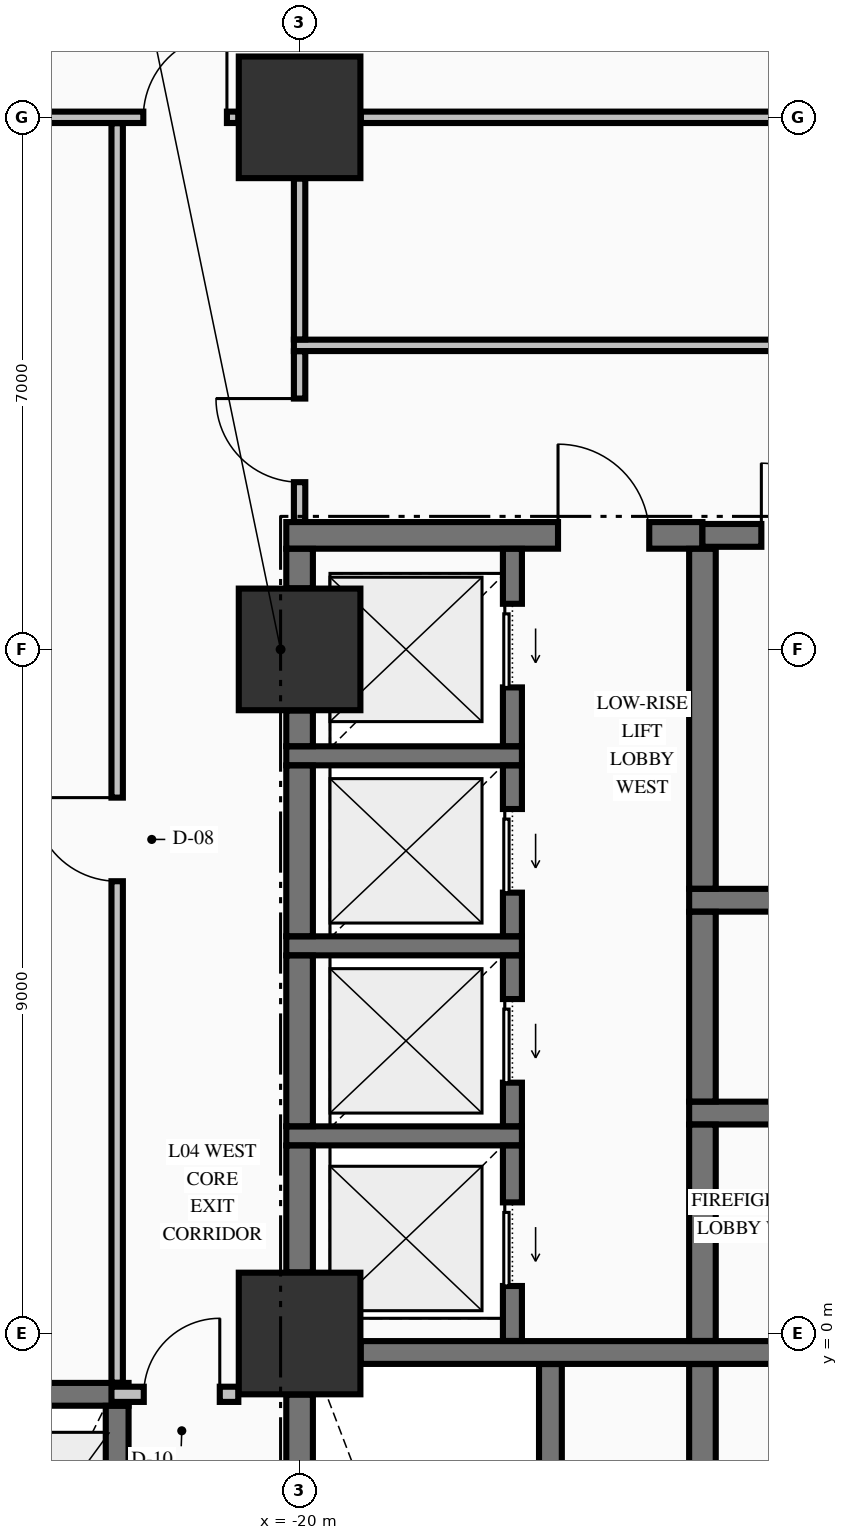
"""IFC4 building model, lengths in metres.
Left out: names, types, materials, properties, quantities, classifications, styles, units other than length and angle.
Written with IfcOpenShell. Run it as: python <this file> out.ifc"""

import sys

from ifc_helpers import new_model, si_unit, direction, frame, frame_2d, origin, origin_2d, place, context, subcontext, project, spatial, rectangle, extrude, element, fill, save


model = new_model("IFC4")
c1 = context("Model", 3, precision=1e-05, world=origin(), true_north=direction((0.0, 1.0)))
c2 = subcontext(c1, "Body", "Model", "MODEL_VIEW")
j1 = project(units=[si_unit("LENGTHUNIT", "METRE"), si_unit("PLANEANGLEUNIT", "RADIAN")], contexts=[c1])
p1 = place(None, origin())
s1 = spatial("IfcSite", under=j1, at=p1, CompositionType="ELEMENT")
p2 = place(p1, origin())
s2 = spatial("IfcBuilding", under=s1, at=p2, CompositionType="ELEMENT")
p3 = place(p2, frame((0.0, 0.0, 21.76)))
s3 = spatial("IfcBuildingStorey", under=s2, at=p3, CompositionType="ELEMENT", Elevation=21.76)
for number, where, z_axis, x_axis in (
    (1, (-20.0, 0.0, -0.45), (0.0, 0.0, 1.0), (1.0, 0.0, 0.0)),
    (2, (-20.0, 9.0, -0.45), (0.0, 0.0, 1.0), (1.0, 0.0, 0.0)),
    (3, (-20.0, 16.0, -0.45), (0.0, 0.0, 1.0), (1.0, 0.0, 0.0)),
):
    element("IfcColumn", number, at=place(p3, frame(where, z_axis=z_axis, x_axis=x_axis)), inside=s3, PredefinedType="COLUMN", context=c2, shape_type="SweptSolid", body=[
        extrude(rectangle(XDim=1.6, YDim=1.6, at=origin_2d()), origin(), (0.0, 0.0, 1.0), 5.44),
    ])
p4 = place(p3, frame((-25.296, -0.8, 0.0), z_axis=(0.0, 0.0, 1.0), x_axis=(1.0, 0.0, 0.0)))
e4 = element("IfcWall", 4, at=p4, inside=s3, PredefinedType="SHEAR", context=c2, shape_type="SweptSolid", body=[
    extrude(rectangle(XDim=3.046, YDim=0.3, at=frame_2d((1.523, 0.0))), origin(), (0.0, 0.0, 1.0), 4.99),
])
p5 = place(p3, frame((-19.196, -0.25, 0.0), z_axis=(0.0, 0.0, 1.0), x_axis=(1.0, 0.0, 0.0)))
e5 = element("IfcWall", 5, at=p5, inside=s3, PredefinedType="SHEAR", context=c2, shape_type="SweptSolid", body=[
    extrude(rectangle(XDim=7.392, YDim=0.3, at=frame_2d((3.696, 0.0))), origin(), (0.0, 0.0, 1.0), 4.99),
])
p6 = place(p5, frame((5.496, 0.0, 0.0)))
e6 = element("IfcOpeningElement", 6, at=p6, cuts=e5, PredefinedType="OPENING", context=c2, shape_type="SweptSolid", body=[
    extrude(rectangle(XDim=1.1, YDim=2.15, at=frame_2d((0.55, 1.075))), frame((0.0, 0.16, 0.0), z_axis=(0.0, -1.0, 0.0), x_axis=(1.0, 0.0, 0.0)), (0.0, 0.0, 1.0), 0.32),
])
p7 = place(p3, frame((-20.175, 2.6, 0.0), z_axis=(0.0, 0.0, 1.0), x_axis=(1.0, 0.0, 0.0)))
e7 = element("IfcWall", 7, at=p7, inside=s3, PredefinedType="SOLIDWALL", context=c2, shape_type="SweptSolid", body=[
    extrude(rectangle(XDim=3.1, YDim=0.25, at=frame_2d((1.55, 0.0))), origin(), (0.0, 0.0, 1.0), 4.99),
])
p8 = place(p3, frame((-14.875, 2.9, 0.0), z_axis=(0.0, 0.0, 1.0), x_axis=(1.0, 0.0, 0.0)))
e8 = element("IfcWall", 8, at=p8, inside=s3, PredefinedType="SHEAR", context=c2, shape_type="SweptSolid", body=[
    extrude(rectangle(XDim=4.025, YDim=0.3, at=frame_2d((2.012, 0.0))), origin(), (0.0, 0.0, 1.0), 4.99),
])
p9 = place(p8, frame((2.075, 0.0, 0.0)))
e9 = element("IfcOpeningElement", 9, at=p9, cuts=e8, PredefinedType="OPENING", context=c2, shape_type="SweptSolid", body=[
    extrude(rectangle(XDim=1.1, YDim=2.2, at=frame_2d((0.55, 1.1))), frame((0.0, 0.16, 0.0), z_axis=(0.0, -1.0, 0.0), x_axis=(1.0, 0.0, 0.0)), (0.0, 0.0, 1.0), 0.32),
])
p10 = place(p3, frame((-20.175, 5.1, 0.0), z_axis=(0.0, 0.0, 1.0), x_axis=(1.0, 0.0, 0.0)))
e10 = element("IfcWall", 10, at=p10, inside=s3, PredefinedType="SOLIDWALL", context=c2, shape_type="SweptSolid", body=[
    extrude(rectangle(XDim=3.1, YDim=0.25, at=frame_2d((1.55, 0.0))), origin(), (0.0, 0.0, 1.0), 4.99),
])
p11 = place(p3, frame((-14.875, 5.7, 0.0), z_axis=(0.0, 0.0, 1.0), x_axis=(1.0, 0.0, 0.0)))
e11 = element("IfcWall", 11, at=p11, inside=s3, PredefinedType="SHEAR", context=c2, shape_type="SweptSolid", body=[
    extrude(rectangle(XDim=4.025, YDim=0.3, at=frame_2d((2.012, 0.0))), origin(), (0.0, 0.0, 1.0), 4.99),
])
p12 = place(p3, frame((-20.175, 7.6, 0.0), z_axis=(0.0, 0.0, 1.0), x_axis=(1.0, 0.0, 0.0)))
e12 = element("IfcWall", 12, at=p12, inside=s3, PredefinedType="SOLIDWALL", context=c2, shape_type="SweptSolid", body=[
    extrude(rectangle(XDim=3.1, YDim=0.25, at=frame_2d((1.55, 0.0))), origin(), (0.0, 0.0, 1.0), 4.99),
])
p13 = place(p3, frame((-20.175, 10.5, 0.0), z_axis=(0.0, 0.0, 1.0), x_axis=(1.0, 0.0, 0.0)))
e13 = element("IfcWall", 13, at=p13, inside=s3, PredefinedType="SHEAR", context=c2, shape_type="SweptSolid", body=[
    extrude(rectangle(XDim=5.475, YDim=0.35, at=frame_2d((2.738, 0.0))), origin(), (0.0, 0.0, 1.0), 4.99),
])
p14 = place(p13, frame((3.575, 0.0, 0.0)))
e14 = element("IfcOpeningElement", 14, at=p14, cuts=e13, PredefinedType="OPENING", context=c2, shape_type="SweptSolid", body=[
    extrude(rectangle(XDim=1.2, YDim=2.15, at=frame_2d((0.6, 1.075))), frame((0.0, 0.185, 0.0), z_axis=(0.0, -1.0, 0.0), x_axis=(1.0, 0.0, 0.0)), (0.0, 0.0, 1.0), 0.37),
])
p15 = place(p3, frame((-14.7, 10.5, 0.0), z_axis=(0.0, 0.0, 1.0), x_axis=(1.0, 0.0, 0.0)))
e15 = element("IfcWall", 15, at=p15, inside=s3, PredefinedType="SHEAR", context=c2, shape_type="SweptSolid", body=[
    extrude(rectangle(XDim=3.85, YDim=0.3, at=frame_2d((1.925, 0.0))), origin(), (0.0, 0.0, 1.0), 4.99),
])
p16 = place(p15, frame((0.775, 0.0, 0.0)))
e16 = element("IfcOpeningElement", 16, at=p16, cuts=e15, PredefinedType="OPENING", context=c2, shape_type="SweptSolid", body=[
    extrude(rectangle(XDim=0.95, YDim=2.15, at=frame_2d((0.475, 1.075))), frame((0.0, 0.16, 0.0), z_axis=(0.0, -1.0, 0.0), x_axis=(1.0, 0.0, 0.0)), (0.0, 0.0, 1.0), 0.32),
])
p17 = place(p3, frame((-22.475, -0.8, 0.0), z_axis=(0.0, 0.0, 1.0), x_axis=(1.0, 0.0, 0.0)))
e17 = element("IfcWall", 17, at=p17, inside=s3, PredefinedType="PARTITIONING", context=c2, shape_type="SweptSolid", body=[
    extrude(rectangle(XDim=1.669, YDim=0.2, at=frame_2d((0.834, 0.0))), origin(), (0.0, 0.0, 1.0), 4.99),
])
p18 = place(p17, frame((0.425, 0.0, 0.0)))
e18 = element("IfcOpeningElement", 18, at=p18, cuts=e17, PredefinedType="OPENING", context=c2, shape_type="SweptSolid", body=[
    extrude(rectangle(XDim=1.0, YDim=2.15, at=frame_2d((0.5, 1.075))), frame((0.0, 0.11, 0.0), z_axis=(0.0, -1.0, 0.0), x_axis=(1.0, 0.0, 0.0)), (0.0, 0.0, 1.0), 0.22),
])
p19 = place(p3, frame((-20.075, 13.0, 0.0), z_axis=(0.0, 0.0, 1.0), x_axis=(1.0, 0.0, 0.0)))
e19 = element("IfcWall", 19, at=p19, inside=s3, PredefinedType="PARTITIONING", context=c2, shape_type="SweptSolid", body=[
    extrude(rectangle(XDim=40.15, YDim=0.15, at=frame_2d((20.075, 0.0))), origin(), (0.0, 0.0, 1.0), 4.99),
])
p20 = place(p19, frame((9.725, 0.0, 0.0)))
e20 = element("IfcOpeningElement", 20, at=p20, cuts=e19, PredefinedType="OPENING", context=c2, shape_type="SweptSolid", body=[
    extrude(rectangle(XDim=1.1, YDim=2.15, at=frame_2d((0.55, 1.075))), frame((0.0, 0.085, 0.0), z_axis=(0.0, -1.0, 0.0), x_axis=(1.0, 0.0, 0.0)), (0.0, 0.0, 1.0), 0.17),
])
p21 = place(p19, frame((29.325, 0.0, 0.0)))
e21 = element("IfcOpeningElement", 21, at=p21, cuts=e19, PredefinedType="OPENING", context=c2, shape_type="SweptSolid", body=[
    extrude(rectangle(XDim=1.1, YDim=2.15, at=frame_2d((0.55, 1.075))), frame((0.0, 0.085, 0.0), z_axis=(0.0, -1.0, 0.0), x_axis=(1.0, 0.0, 0.0)), (0.0, 0.0, 1.0), 0.17),
])
p22 = place(p3, frame((-25.294, 16.0, 0.0), z_axis=(0.0, 0.0, 1.0), x_axis=(1.0, 0.0, 0.0)))
e22 = element("IfcWall", 22, at=p22, inside=s3, PredefinedType="PARTITIONING", context=c2, shape_type="SweptSolid", body=[
    extrude(rectangle(XDim=4.488, YDim=0.15, at=frame_2d((2.244, 0.0))), origin(), (0.0, 0.0, 1.0), 3.332),
])
p23 = place(p22, frame((3.238, 0.0, 0.0)))
e23 = element("IfcOpeningElement", 23, at=p23, cuts=e22, PredefinedType="OPENING", context=c2, shape_type="SweptSolid", body=[
    extrude(rectangle(XDim=1.1, YDim=2.15, at=frame_2d((0.55, 1.075))), frame((0.0, 0.085, 0.0), z_axis=(0.0, -1.0, 0.0), x_axis=(1.0, 0.0, 0.0)), (0.0, 0.0, 1.0), 0.17),
])
p24 = place(p3, frame((-19.194, 16.0, 0.0), z_axis=(0.0, 0.0, 1.0), x_axis=(1.0, 0.0, 0.0)))
e24 = element("IfcWall", 24, at=p24, inside=s3, PredefinedType="PARTITIONING", context=c2, shape_type="SweptSolid", body=[
    extrude(rectangle(XDim=7.388, YDim=0.15, at=frame_2d((3.694, 0.0))), origin(), (0.0, 0.0, 1.0), 3.332),
])
p25 = place(p3, frame((-22.4, -4.648, 0.0), z_axis=(0.0, 0.0, 1.0), x_axis=(0.0, 1.0, 0.0)))
e25 = element("IfcWall", 25, at=p25, inside=s3, PredefinedType="SHEAR", context=c2, shape_type="SweptSolid", body=[
    extrude(rectangle(XDim=3.696, YDim=0.3, at=frame_2d((1.848, 0.0))), origin(), (0.0, 0.0, 1.0), 4.99),
])
p26 = place(p25, frame((1.198, 0.0, 0.0)))
e26 = element("IfcOpeningElement", 26, at=p26, cuts=e25, PredefinedType="OPENING", context=c2, shape_type="SweptSolid", body=[
    extrude(rectangle(XDim=1.3, YDim=2.3, at=frame_2d((0.65, 1.15))), frame((0.0, 0.16, 0.0), z_axis=(0.0, -1.0, 0.0), x_axis=(1.0, 0.0, 0.0)), (0.0, 0.0, 1.0), 0.32),
])
p27 = place(p3, frame((-20.0, -8.196, 0.0), z_axis=(0.0, 0.0, 1.0), x_axis=(0.0, 1.0, 0.0)))
e27 = element("IfcWall", 27, at=p27, inside=s3, PredefinedType="SHEAR", context=c2, shape_type="SweptSolid", body=[
    extrude(rectangle(XDim=7.392, YDim=0.35, at=frame_2d((3.696, 0.0))), origin(), (0.0, 0.0, 1.0), 4.99),
])
p28 = place(p3, frame((-20.0, 0.804, 0.0), z_axis=(0.0, 0.0, 1.0), x_axis=(0.0, 1.0, 0.0)))
e28 = element("IfcWall", 28, at=p28, inside=s3, PredefinedType="SHEAR", context=c2, shape_type="SweptSolid", body=[
    extrude(rectangle(XDim=1.669, YDim=0.35, at=frame_2d((0.834, 0.0))), origin(), (0.0, 0.0, 1.0), 4.99),
])
for number, where, z_axis, x_axis in (
    (29, (-20.0, 2.727, 0.0), (0.0, 0.0, 1.0), (0.0, 1.0, 0.0)),
    (30, (-20.0, 5.227, 0.0), (0.0, 0.0, 1.0), (0.0, 1.0, 0.0)),
):
    element("IfcWall", number, at=place(p3, frame(where, z_axis=z_axis, x_axis=x_axis)), inside=s3, PredefinedType="SHEAR", context=c2, shape_type="SweptSolid", body=[
        extrude(rectangle(XDim=2.246, YDim=0.35, at=frame_2d((1.123, 0.0))), origin(), (0.0, 0.0, 1.0), 4.99),
    ])
p29 = place(p3, frame((-20.0, 7.727, 0.0), z_axis=(0.0, 0.0, 1.0), x_axis=(0.0, 1.0, 0.0)))
e31 = element("IfcWall", 31, at=p29, inside=s3, PredefinedType="SHEAR", context=c2, shape_type="SweptSolid", body=[
    extrude(rectangle(XDim=0.469, YDim=0.35, at=frame_2d((0.234, 0.0))), origin(), (0.0, 0.0, 1.0), 4.99),
])
p30 = place(p3, frame((-20.0, 9.804, 0.0), z_axis=(0.0, 0.0, 1.0), x_axis=(0.0, 1.0, 0.0)))
e32 = element("IfcWall", 32, at=p30, inside=s3, PredefinedType="SHEAR", context=c2, shape_type="SweptSolid", body=[
    extrude(rectangle(XDim=0.519, YDim=0.35, at=frame_2d((0.26, 0.0))), origin(), (0.0, 0.0, 1.0), 4.99),
])
p31 = place(p3, frame((-17.2, -0.098, 0.0), z_axis=(0.0, 0.0, 1.0), x_axis=(0.0, 1.0, 0.0)))
e33 = element("IfcWall", 33, at=p31, inside=s3, PredefinedType="SOLIDWALL", context=c2, shape_type="SweptSolid", body=[
    extrude(rectangle(XDim=2.571, YDim=0.25, at=frame_2d((1.285, 0.0))), origin(), (0.0, 0.0, 1.0), 4.99),
])
p32 = place(p31, frame((0.723, 0.0, 0.0)))
e34 = element("IfcOpeningElement", 34, at=p32, cuts=e33, PredefinedType="OPENING", context=c2, shape_type="SweptSolid", body=[
    extrude(rectangle(XDim=1.1, YDim=2.2, at=frame_2d((0.55, 1.1))), frame((0.0, 0.135, 0.0), z_axis=(0.0, -1.0, 0.0), x_axis=(1.0, 0.0, 0.0)), (0.0, 0.0, 1.0), 0.27),
])
p33 = place(p3, frame((-17.2, 2.727, 0.0), z_axis=(0.0, 0.0, 1.0), x_axis=(0.0, 1.0, 0.0)))
e35 = element("IfcWall", 35, at=p33, inside=s3, PredefinedType="SOLIDWALL", context=c2, shape_type="SweptSolid", body=[
    extrude(rectangle(XDim=2.246, YDim=0.25, at=frame_2d((1.123, 0.0))), origin(), (0.0, 0.0, 1.0), 4.99),
])
p34 = place(p33, frame((0.573, 0.0, 0.0)))
e36 = element("IfcOpeningElement", 36, at=p34, cuts=e35, PredefinedType="OPENING", context=c2, shape_type="SweptSolid", body=[
    extrude(rectangle(XDim=1.1, YDim=2.2, at=frame_2d((0.55, 1.1))), frame((0.0, 0.135, 0.0), z_axis=(0.0, -1.0, 0.0), x_axis=(1.0, 0.0, 0.0)), (0.0, 0.0, 1.0), 0.27),
])
p35 = place(p3, frame((-17.2, 5.227, 0.0), z_axis=(0.0, 0.0, 1.0), x_axis=(0.0, 1.0, 0.0)))
e37 = element("IfcWall", 37, at=p35, inside=s3, PredefinedType="SOLIDWALL", context=c2, shape_type="SweptSolid", body=[
    extrude(rectangle(XDim=2.246, YDim=0.25, at=frame_2d((1.123, 0.0))), origin(), (0.0, 0.0, 1.0), 4.99),
])
p36 = place(p35, frame((0.573, 0.0, 0.0)))
e38 = element("IfcOpeningElement", 38, at=p36, cuts=e37, PredefinedType="OPENING", context=c2, shape_type="SweptSolid", body=[
    extrude(rectangle(XDim=1.1, YDim=2.2, at=frame_2d((0.55, 1.1))), frame((0.0, 0.135, 0.0), z_axis=(0.0, -1.0, 0.0), x_axis=(1.0, 0.0, 0.0)), (0.0, 0.0, 1.0), 0.27),
])
p37 = place(p3, frame((-17.2, 7.727, 0.0), z_axis=(0.0, 0.0, 1.0), x_axis=(0.0, 1.0, 0.0)))
e39 = element("IfcWall", 39, at=p37, inside=s3, PredefinedType="SOLIDWALL", context=c2, shape_type="SweptSolid", body=[
    extrude(rectangle(XDim=2.596, YDim=0.25, at=frame_2d((1.298, 0.0))), origin(), (0.0, 0.0, 1.0), 4.99),
])
p38 = place(p37, frame((0.773, 0.0, 0.0)))
e40 = element("IfcOpeningElement", 40, at=p38, cuts=e39, PredefinedType="OPENING", context=c2, shape_type="SweptSolid", body=[
    extrude(rectangle(XDim=1.1, YDim=2.2, at=frame_2d((0.55, 1.1))), frame((0.0, 0.135, 0.0), z_axis=(0.0, -1.0, 0.0), x_axis=(1.0, 0.0, 0.0)), (0.0, 0.0, 1.0), 0.27),
])
p39 = place(p3, frame((-16.7, -9.773, 0.0), z_axis=(0.0, 0.0, 1.0), x_axis=(0.0, 1.0, 0.0)))
e41 = element("IfcWall", 41, at=p39, inside=s3, PredefinedType="SHEAR", context=c2, shape_type="SweptSolid", body=[
    extrude(rectangle(XDim=9.371, YDim=0.3, at=frame_2d((4.686, 0.0))), origin(), (0.0, 0.0, 1.0), 4.99),
])
p40 = place(p3, frame((-14.7, -9.773, 0.0), z_axis=(0.0, 0.0, 1.0), x_axis=(0.0, 1.0, 0.0)))
e42 = element("IfcWall", 42, at=p40, inside=s3, PredefinedType="SHEAR", context=c2, shape_type="SweptSolid", body=[
    extrude(rectangle(XDim=9.371, YDim=0.35, at=frame_2d((4.686, 0.0))), origin(), (0.0, 0.0, 1.0), 4.99),
])
p41 = place(p3, frame((-14.7, -0.098, 0.0), z_axis=(0.0, 0.0, 1.0), x_axis=(0.0, 1.0, 0.0)))
e43 = element("IfcWall", 43, at=p41, inside=s3, PredefinedType="SHEAR", context=c2, shape_type="SweptSolid", body=[
    extrude(rectangle(XDim=2.846, YDim=0.35, at=frame_2d((1.423, 0.0))), origin(), (0.0, 0.0, 1.0), 4.99),
])
p42 = place(p3, frame((-14.7, 3.052, 0.0), z_axis=(0.0, 0.0, 1.0), x_axis=(0.0, 1.0, 0.0)))
e44 = element("IfcWall", 44, at=p42, inside=s3, PredefinedType="SHEAR", context=c2, shape_type="SweptSolid", body=[
    extrude(rectangle(XDim=2.496, YDim=0.35, at=frame_2d((1.248, 0.0))), origin(), (0.0, 0.0, 1.0), 4.99),
])
p43 = place(p3, frame((-14.7, 5.852, 0.0), z_axis=(0.0, 0.0, 1.0), x_axis=(0.0, 1.0, 0.0)))
e45 = element("IfcWall", 45, at=p43, inside=s3, PredefinedType="SHEAR", context=c2, shape_type="SweptSolid", body=[
    extrude(rectangle(XDim=4.471, YDim=0.35, at=frame_2d((2.235, 0.0))), origin(), (0.0, 0.0, 1.0), 4.99),
])
p44 = place(p3, frame((-22.4, -0.647, 0.0), z_axis=(0.0, 0.0, 1.0), x_axis=(0.0, 1.0, 0.0)))
e46 = element("IfcWall", 46, at=p44, inside=s3, PredefinedType="PARTITIONING", context=c2, shape_type="SweptSolid", body=[
    extrude(rectangle(XDim=16.569, YDim=0.15, at=frame_2d((8.285, 0.0))), origin(), (0.0, 0.0, 1.0), 4.99),
])
p45 = place(p44, frame((6.597, 0.0, 0.0)))
e47 = element("IfcOpeningElement", 47, at=p45, cuts=e46, PredefinedType="OPENING", context=c2, shape_type="SweptSolid", body=[
    extrude(rectangle(XDim=1.1, YDim=2.15, at=frame_2d((0.55, 1.075))), frame((0.0, 0.085, 0.0), z_axis=(0.0, -1.0, 0.0), x_axis=(1.0, 0.0, 0.0)), (0.0, 0.0, 1.0), 0.17),
])
p46 = place(p3, frame((-20.0, 10.678, 0.0), z_axis=(0.0, 0.0, 1.0), x_axis=(0.0, 1.0, 0.0)))
e48 = element("IfcWall", 48, at=p46, inside=s3, PredefinedType="PARTITIONING", context=c2, shape_type="SweptSolid", body=[
    extrude(rectangle(XDim=2.244, YDim=0.15, at=frame_2d((1.122, 0.0))), origin(), (0.0, 0.0, 1.0), 4.032),
])
p47 = place(p46, frame((0.522, 0.0, 0.0)))
e49 = element("IfcOpeningElement", 49, at=p47, cuts=e48, PredefinedType="OPENING", context=c2, shape_type="SweptSolid", body=[
    extrude(rectangle(XDim=1.1, YDim=2.15, at=frame_2d((0.55, 1.075))), frame((0.0, 0.085, 0.0), z_axis=(0.0, -1.0, 0.0), x_axis=(1.0, 0.0, 0.0)), (0.0, 0.0, 1.0), 0.17),
])
p48 = place(p3, frame((-20.0, 13.078, 0.0), z_axis=(0.0, 0.0, 1.0), x_axis=(0.0, 1.0, 0.0)))
e50 = element("IfcWall", 50, at=p48, inside=s3, PredefinedType="PARTITIONING", context=c2, shape_type="SweptSolid", body=[
    extrude(rectangle(XDim=2.116, YDim=0.15, at=frame_2d((1.058, 0.0))), origin(), (0.0, 0.0, 1.0), 4.032),
])
p49 = place(p16, origin())
e51 = element("IfcDoor", 51, at=p49, inside=s3, OperationType="SINGLE_SWING_LEFT", PredefinedType="DOOR", context=c2, shape_type="SweptSolid", body=[
    extrude(rectangle(XDim=0.95, YDim=2.15, at=frame_2d((0.475, 1.075))), frame((0.0, 0.025, 0.0), z_axis=(0.0, -1.0, 0.0), x_axis=(1.0, 0.0, 0.0)), (0.0, 0.0, 1.0), 0.05),
])
fill(e16, e51)
p50 = place(p14, origin())
e52 = element("IfcDoor", 52, at=p50, inside=s3, OperationType="SINGLE_SWING_LEFT", PredefinedType="DOOR", context=c2, shape_type="SweptSolid", body=[
    extrude(rectangle(XDim=1.2, YDim=2.15, at=frame_2d((0.6, 1.075))), frame((0.0, 0.025, 0.0), z_axis=(0.0, -1.0, 0.0), x_axis=(1.0, 0.0, 0.0)), (0.0, 0.0, 1.0), 0.05),
])
fill(e14, e52)
p51 = place(p32, origin())
e53 = element("IfcDoor", 53, at=p51, inside=s3, OperationType="SLIDING_TO_LEFT", PredefinedType="DOOR", context=c2, shape_type="SweptSolid", body=[
    extrude(rectangle(XDim=1.1, YDim=2.2, at=frame_2d((0.55, 1.1))), frame((0.0, 0.025, 0.0), z_axis=(0.0, -1.0, 0.0), x_axis=(1.0, 0.0, 0.0)), (0.0, 0.0, 1.0), 0.05),
])
fill(e34, e53)
p52 = place(p34, origin())
e54 = element("IfcDoor", 54, at=p52, inside=s3, OperationType="SLIDING_TO_LEFT", PredefinedType="DOOR", context=c2, shape_type="SweptSolid", body=[
    extrude(rectangle(XDim=1.1, YDim=2.2, at=frame_2d((0.55, 1.1))), frame((0.0, 0.025, 0.0), z_axis=(0.0, -1.0, 0.0), x_axis=(1.0, 0.0, 0.0)), (0.0, 0.0, 1.0), 0.05),
])
fill(e36, e54)
p53 = place(p36, origin())
e55 = element("IfcDoor", 55, at=p53, inside=s3, OperationType="SLIDING_TO_LEFT", PredefinedType="DOOR", context=c2, shape_type="SweptSolid", body=[
    extrude(rectangle(XDim=1.1, YDim=2.2, at=frame_2d((0.55, 1.1))), frame((0.0, 0.025, 0.0), z_axis=(0.0, -1.0, 0.0), x_axis=(1.0, 0.0, 0.0)), (0.0, 0.0, 1.0), 0.05),
])
fill(e38, e55)
p54 = place(p38, origin())
e56 = element("IfcDoor", 56, at=p54, inside=s3, OperationType="SLIDING_TO_LEFT", PredefinedType="DOOR", context=c2, shape_type="SweptSolid", body=[
    extrude(rectangle(XDim=1.1, YDim=2.2, at=frame_2d((0.55, 1.1))), frame((0.0, 0.025, 0.0), z_axis=(0.0, -1.0, 0.0), x_axis=(1.0, 0.0, 0.0)), (0.0, 0.0, 1.0), 0.05),
])
fill(e40, e56)
p55 = place(p18, origin())
e57 = element("IfcDoor", 57, at=p55, inside=s3, OperationType="SINGLE_SWING_RIGHT", PredefinedType="DOOR", context=c2, shape_type="SweptSolid", body=[
    extrude(rectangle(XDim=1.0, YDim=2.15, at=frame_2d((0.5, 1.075))), frame((0.0, 0.025, 0.0), z_axis=(0.0, -1.0, 0.0), x_axis=(1.0, 0.0, 0.0)), (0.0, 0.0, 1.0), 0.05),
])
fill(e18, e57)
p56 = place(p45, origin())
e58 = element("IfcDoor", 58, at=p56, inside=s3, OperationType="SINGLE_SWING_RIGHT", PredefinedType="DOOR", context=c2, shape_type="SweptSolid", body=[
    extrude(rectangle(XDim=1.1, YDim=2.15, at=frame_2d((0.55, 1.075))), frame((0.0, 0.025, 0.0), z_axis=(0.0, -1.0, 0.0), x_axis=(1.0, 0.0, 0.0)), (0.0, 0.0, 1.0), 0.05),
])
fill(e47, e58)
p57 = place(p23, origin())
e59 = element("IfcDoor", 59, at=p57, inside=s3, OperationType="SINGLE_SWING_RIGHT", PredefinedType="DOOR", context=c2, shape_type="SweptSolid", body=[
    extrude(rectangle(XDim=1.1, YDim=2.15, at=frame_2d((0.55, 1.075))), frame((0.0, 0.025, 0.0), z_axis=(0.0, -1.0, 0.0), x_axis=(1.0, 0.0, 0.0)), (0.0, 0.0, 1.0), 0.05),
])
fill(e23, e59)
p58 = place(p47, origin())
e60 = element("IfcDoor", 60, at=p58, inside=s3, OperationType="SINGLE_SWING_RIGHT", PredefinedType="DOOR", context=c2, shape_type="SweptSolid", body=[
    extrude(rectangle(XDim=1.1, YDim=2.15, at=frame_2d((0.55, 1.075))), frame((0.0, 0.025, 0.0), z_axis=(0.0, -1.0, 0.0), x_axis=(1.0, 0.0, 0.0)), (0.0, 0.0, 1.0), 0.05),
])
fill(e49, e60)
save(model, sys.argv[1])
